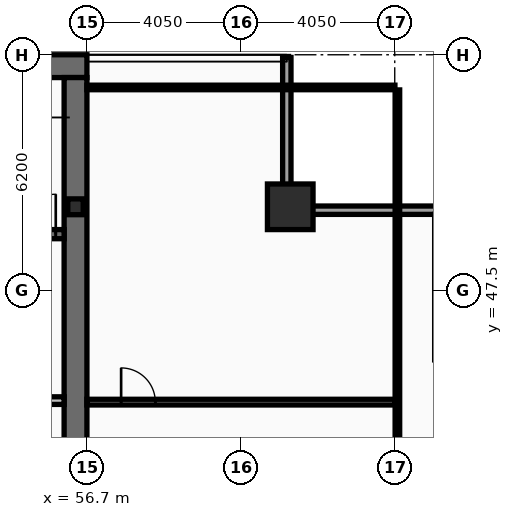
"""IFC4 building model, lengths in metres.
Left out: names, types, materials, properties, quantities, classifications, styles, units other than length and angle.
Written with IfcOpenShell. Run it as: python <this file> out.ifc"""

import sys

from ifc_helpers import new_model, si_unit, direction, frame, frame_2d, origin, origin_2d, place, context, subcontext, project, spatial, rectangle, hollow_rectangle, i_section, extrude, element, fill, save


model = new_model("IFC4")
c1 = context("Model", 3, precision=1e-05, world=origin(), true_north=direction((0.0, 1.0)))
c2 = subcontext(c1, "Body", "Model", "MODEL_VIEW")
j1 = project(units=[si_unit("LENGTHUNIT", "METRE"), si_unit("PLANEANGLEUNIT", "RADIAN")], contexts=[c1])
p1 = place(None, origin())
s1 = spatial("IfcSite", under=j1, at=p1, CompositionType="ELEMENT")
p2 = place(p1, origin())
s2 = spatial("IfcBuilding", under=s1, at=p2, CompositionType="ELEMENT")
p3 = place(p2, frame((0.0, 0.0, 206.6)))
s3 = spatial("IfcBuildingStorey", under=s2, at=p3, CompositionType="ELEMENT", Elevation=206.6)
p4 = place(p3, frame((16.2, 53.4, 0.0), z_axis=(0.0, 0.0, 1.0), x_axis=(1.0, 0.0, 0.0)))
e1 = element("IfcWall", 1, at=p4, inside=s3, PredefinedType="SHEAR", context=c2, shape_type="SweptSolid", body=[
    extrude(rectangle(XDim=40.5, YDim=0.6, at=frame_2d((20.25, 0.0))), origin(), (0.0, 0.0, 1.0), 3.44),
])
p5 = place(p3, frame((56.4, 53.1, 0.0), z_axis=(0.0, 0.0, 1.0), x_axis=(0.0, -1.0, 0.0)))
e2 = element("IfcWall", 2, at=p5, inside=s3, PredefinedType="SHEAR", context=c2, shape_type="SweptSolid", body=[
    extrude(rectangle(XDim=11.2, YDim=0.6, at=frame_2d((5.6, 0.0))), origin(), (0.0, 0.0, 1.0), 3.44),
])
p6 = place(p3, frame((48.63, 48.98, 0.0), z_axis=(0.0, 0.0, 1.0), x_axis=(1.0, 0.0, 0.0)))
e3 = element("IfcWall", 3, at=p6, inside=s3, PredefinedType="SHEAR", context=c2, shape_type="SweptSolid", body=[
    extrude(rectangle(XDim=7.47, YDim=0.24, at=frame_2d((3.735, 0.0))), origin(), (0.0, 0.0, 1.0), 3.44),
])
p7 = place(p6, frame((6.2, 0.0, 0.0)))
e4 = element("IfcOpeningElement", 4, at=p7, cuts=e3, PredefinedType="OPENING", context=c2, shape_type="SweptSolid", body=[
    extrude(rectangle(XDim=1.05, YDim=2.15, at=frame_2d((0.525, 1.075))), frame((0.0, 0.13, 0.0), z_axis=(0.0, -1.0, 0.0), x_axis=(1.0, 0.0, 0.0)), (0.0, 0.0, 1.0), 0.26),
])
p8 = place(p3, frame((62.05, 49.7, 0.0), z_axis=(0.0, 0.0, 1.0), x_axis=(1.0, 0.0, 0.0)))
e5 = element("IfcColumn", 5, at=p8, inside=s3, PredefinedType="COLUMN", context=c2, shape_type="SweptSolid", body=[
    extrude(hollow_rectangle(XDim=1.2, YDim=1.2, WallThickness=0.06, at=origin_2d()), origin(), (0.0, 0.0, 1.0), 3.6),
])
p9 = place(p3, frame((56.4, 49.7, 0.0), z_axis=(0.0, 0.0, 1.0), x_axis=(1.0, 0.0, 0.0)))
e6 = element("IfcColumn", 6, at=p9, inside=s3, PredefinedType="COLUMN", context=c2, shape_type="SweptSolid", body=[
    extrude(i_section(OverallWidth=0.406, OverallDepth=0.416, WebThickness=0.03, FlangeThickness=0.048, at=origin_2d()), origin(), (0.0, 0.0, 1.0), 3.6),
])
p10 = place(p3, frame((61.96, 53.63, 0.0), z_axis=(0.0, 0.0, 1.0), x_axis=(0.0, -1.0, 0.0)))
e7 = element("IfcWall", 7, at=p10, inside=s3, PredefinedType="SOLIDWALL", context=c2, shape_type="SweptSolid", body=[
    extrude(rectangle(XDim=3.91, YDim=0.22, at=frame_2d((1.955, 0.0))), origin(), (0.0, 0.0, 1.0), 2.83),
])
p11 = place(p3, frame((61.85, 49.61, 0.0), z_axis=(0.0, 0.0, 1.0), x_axis=(1.0, 0.0, 0.0)))
e8 = element("IfcWall", 8, at=p11, inside=s3, PredefinedType="SOLIDWALL", context=c2, shape_type="SweptSolid", body=[
    extrude(rectangle(XDim=4.22, YDim=0.22, at=frame_2d((2.11, 0.0))), origin(), (0.0, 0.0, 1.0), 2.83),
])
p12 = place(p3, frame((51.9, 44.6, 0.0), z_axis=(0.0, 0.0, 1.0), x_axis=(1.0, 0.0, 0.0)))
e9 = element("IfcWall", 9, at=p12, inside=s3, PredefinedType="PARTITIONING", context=c2, shape_type="SweptSolid", body=[
    extrude(rectangle(XDim=4.2, YDim=0.2, at=frame_2d((2.1, 0.0))), origin(), (0.0, 0.0, 1.0), 3.44),
])
p13 = place(p12, frame((1.15, 0.0, 0.0)))
e10 = element("IfcOpeningElement", 10, at=p13, cuts=e9, PredefinedType="OPENING", context=c2, shape_type="SweptSolid", body=[
    extrude(rectangle(XDim=1.05, YDim=2.15, at=frame_2d((0.525, 1.075))), frame((0.0, 0.11, 0.0), z_axis=(0.0, -1.0, 0.0), x_axis=(1.0, 0.0, 0.0)), (0.0, 0.0, 1.0), 0.22),
])
p14 = place(p3, frame((56.7, 44.56, 0.0), z_axis=(0.0, 0.0, 1.0), x_axis=(1.0, 0.0, 0.0)))
e11 = element("IfcWall", 11, at=p14, inside=s3, PredefinedType="PARTITIONING", context=c2, shape_type="SweptSolid", body=[
    extrude(rectangle(XDim=8.105, YDim=0.15, at=frame_2d((4.052, 0.0))), origin(), (0.0, 0.0, 1.0), 2.83),
])
p15 = place(p14, frame((0.9, 0.0, 0.0)))
e12 = element("IfcOpeningElement", 12, at=p15, cuts=e11, PredefinedType="OPENING", context=c2, shape_type="SweptSolid", body=[
    extrude(rectangle(XDim=0.9, YDim=2.05, at=frame_2d((0.45, 1.025))), frame((0.0, 0.085, 0.0), z_axis=(0.0, -1.0, 0.0), x_axis=(1.0, 0.0, 0.0)), (0.0, 0.0, 1.0), 0.17),
])
p16 = place(p3, frame((64.87, 10.665, 0.0), z_axis=(0.0, 0.0, 1.0), x_axis=(0.0, 1.0, 0.0)))
e13 = element("IfcWall", 13, at=p16, inside=s3, PredefinedType="PARTITIONING", context=c2, shape_type="SweptSolid", body=[
    extrude(rectangle(XDim=42.11, YDim=0.12, at=frame_2d((21.055, 0.0))), origin(), (0.0, 0.0, 1.0), 2.73),
])
p17 = place(p3, frame((56.7, 52.84, 0.0), z_axis=(0.0, 0.0, 1.0), x_axis=(1.0, 0.0, 0.0)))
e14 = element("IfcWall", 14, at=p17, inside=s3, PredefinedType="PARTITIONING", context=c2, shape_type="SweptSolid", body=[
    extrude(rectangle(XDim=8.105, YDim=0.12, at=frame_2d((4.052, 0.0))), origin(), (0.0, 0.0, 1.0), 3.44),
])
p18 = place(p7, origin())
e15 = element("IfcDoor", 15, at=p18, inside=s3, OperationType="SINGLE_SWING_RIGHT", PredefinedType="DOOR", context=c2, shape_type="SweptSolid", body=[
    extrude(rectangle(XDim=1.05, YDim=2.15, at=frame_2d((0.525, 1.075))), frame((0.0, 0.025, 0.0), z_axis=(0.0, -1.0, 0.0), x_axis=(1.0, 0.0, 0.0)), (0.0, 0.0, 1.0), 0.05),
])
fill(e4, e15)
p19 = place(p15, origin())
e16 = element("IfcDoor", 16, at=p19, inside=s3, OperationType="SINGLE_SWING_LEFT", PredefinedType="DOOR", context=c2, shape_type="SweptSolid", body=[
    extrude(rectangle(XDim=0.9, YDim=2.05, at=frame_2d((0.45, 1.025))), frame((0.0, 0.025, 0.0), z_axis=(0.0, -1.0, 0.0), x_axis=(1.0, 0.0, 0.0)), (0.0, 0.0, 1.0), 0.05),
])
fill(e12, e16)
save(model, sys.argv[1])
